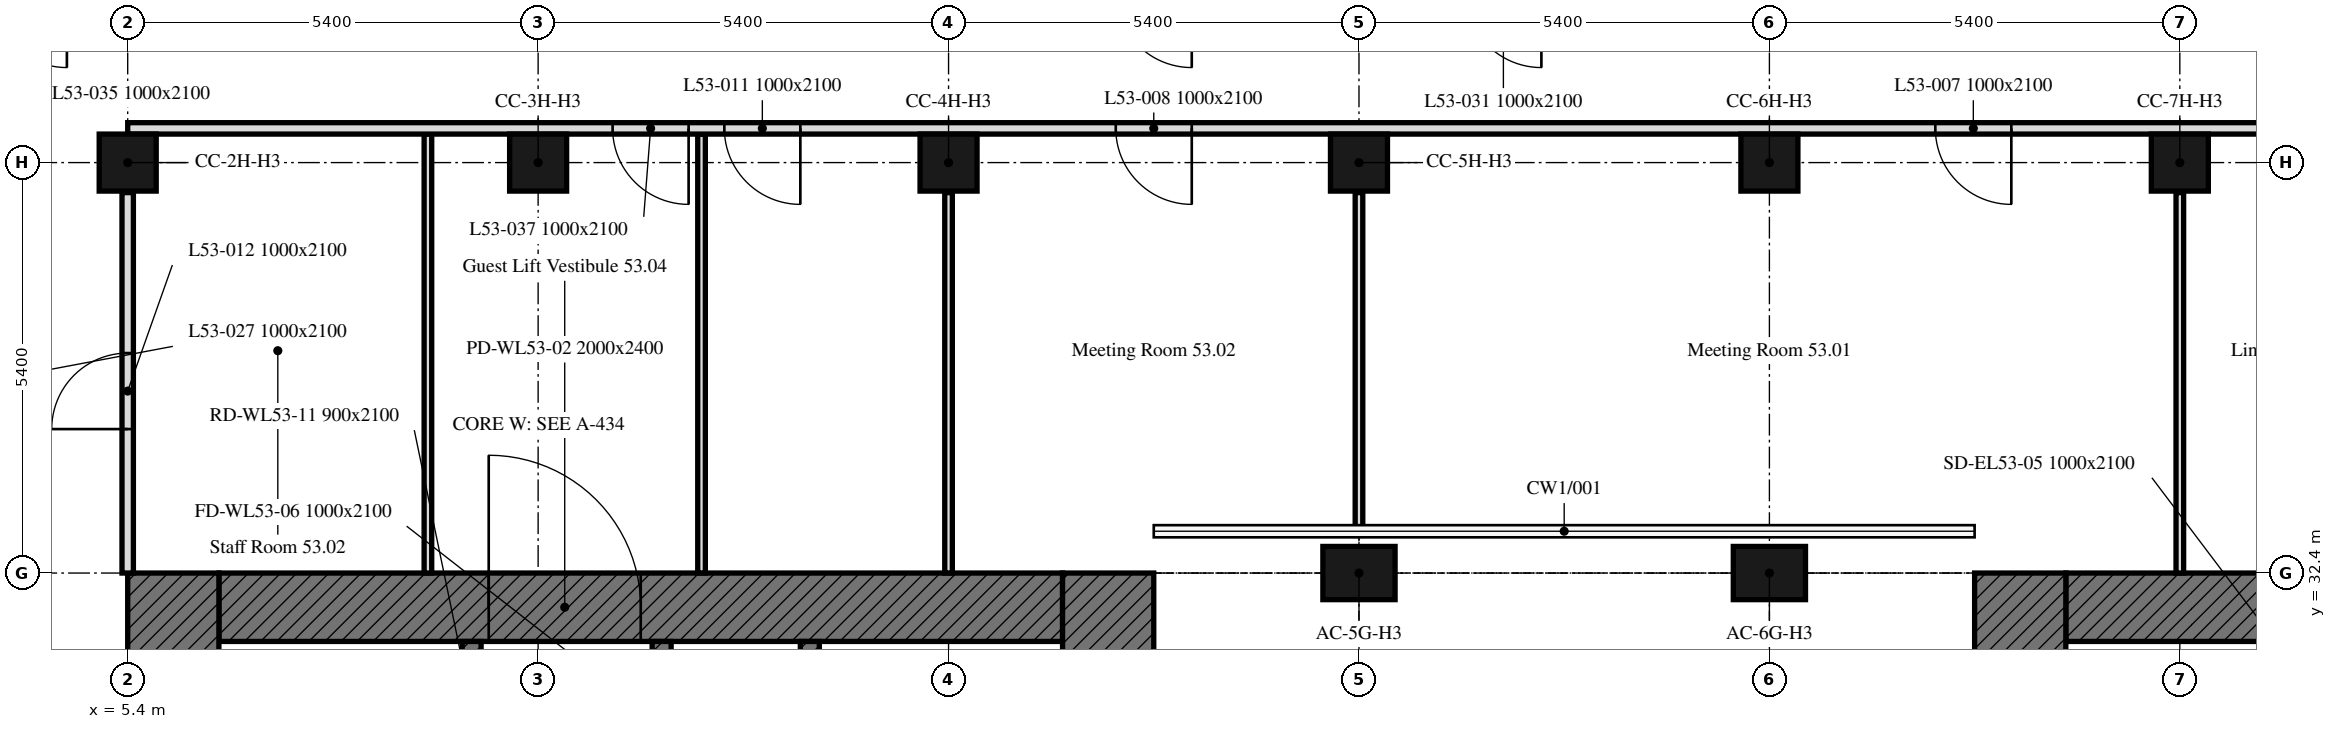
"""IFC4 building model, lengths in metres.
Left out: names, types, materials, properties, quantities, classifications, styles, units other than length and angle.
Written with IfcOpenShell. Run it as: python <this file> out.ifc"""

import sys

from ifc_helpers import new_model, si_unit, direction, frame, frame_2d, origin, origin_2d, place, context, subcontext, project, spatial, rectangle, extrude, element, fill, save


model = new_model("IFC4")
c1 = context("Model", 3, precision=1e-05, world=origin(), true_north=direction((0.0, 1.0)))
c2 = subcontext(c1, "Body", "Model", "MODEL_VIEW")
j1 = project(units=[si_unit("LENGTHUNIT", "METRE"), si_unit("PLANEANGLEUNIT", "RADIAN")], contexts=[c1])
p1 = place(None, origin())
s1 = spatial("IfcSite", under=j1, at=p1, CompositionType="ELEMENT")
p2 = place(p1, origin())
s2 = spatial("IfcBuilding", under=s1, at=p2, CompositionType="ELEMENT")
p3 = place(p2, frame((0.0, 0.0, 213.7)))
s3 = spatial("IfcBuildingStorey", under=s2, at=p3, CompositionType="ELEMENT", Elevation=213.7)
for number, where, z_axis, x_axis in (
    (1, (21.6, 32.4, 0.0), (0.0, 0.0, 1.0), (1.0, 0.0, 0.0)),
    (2, (27.0, 32.4, 0.0), (0.0, 0.0, 1.0), (1.0, 0.0, 0.0)),
):
    element("IfcColumn", number, at=place(p3, frame(where, z_axis=z_axis, x_axis=x_axis)), inside=s3, PredefinedType="COLUMN", context=c2, shape_type="SweptSolid", body=[
        extrude(rectangle(XDim=0.95, YDim=0.7, at=origin_2d()), origin(), (0.0, 0.0, 1.0), 3.0),
    ])
for number, where, z_axis, x_axis in (
    (3, (5.4, 37.8, 0.0), (0.0, 0.0, 1.0), (1.0, 0.0, 0.0)),
    (4, (10.8, 37.8, 0.0), (0.0, 0.0, 1.0), (1.0, 0.0, 0.0)),
    (5, (16.2, 37.8, 0.0), (0.0, 0.0, 1.0), (1.0, 0.0, 0.0)),
    (6, (21.6, 37.8, 0.0), (0.0, 0.0, 1.0), (1.0, 0.0, 0.0)),
    (7, (27.0, 37.8, 0.0), (0.0, 0.0, 1.0), (1.0, 0.0, 0.0)),
    (8, (32.4, 37.8, 0.0), (0.0, 0.0, 1.0), (1.0, 0.0, 0.0)),
):
    element("IfcColumn", number, at=place(p3, frame(where, z_axis=z_axis, x_axis=x_axis)), inside=s3, PredefinedType="COLUMN", context=c2, shape_type="SweptSolid", body=[
        extrude(rectangle(XDim=0.75, YDim=0.75, at=origin_2d()), origin(), (0.0, 0.0, 1.0), 3.0),
    ])
p4 = place(p3, frame((6.6, 31.95, 0.0), z_axis=(0.0, 0.0, 1.0), x_axis=(1.0, 0.0, 0.0)))
e9 = element("IfcWall", 9, at=p4, inside=s3, PredefinedType="SOLIDWALL", context=c2, shape_type="SweptSolid", body=[
    extrude(rectangle(XDim=11.1, YDim=0.9, at=frame_2d((5.55, 0.0))), origin(), (0.0, 0.0, 1.0), 3.0),
])
p5 = place(p4, frame((3.55, 0.0, 0.0)))
e10 = element("IfcOpeningElement", 10, at=p5, cuts=e9, PredefinedType="OPENING", context=c2, shape_type="SweptSolid", body=[
    extrude(rectangle(XDim=2.0, YDim=2.4, at=frame_2d((1.0, 1.2))), frame((0.0, 0.45, 0.0), z_axis=(0.0, -1.0, 0.0), x_axis=(1.0, 0.0, 0.0)), (0.0, 0.0, 1.0), 0.9),
])
for number, where, z_axis, x_axis in (
    (11, (6.0, 16.2, 0.0), (0.0, 0.0, 1.0), (0.0, 1.0, 0.0)),
    (12, (18.3, 32.4, 0.0), (0.0, 0.0, 1.0), (0.0, -1.0, 0.0)),
):
    element("IfcWall", number, at=place(p3, frame(where, z_axis=z_axis, x_axis=x_axis)), inside=s3, PredefinedType="SOLIDWALL", context=c2, shape_type="SweptSolid", body=[
        extrude(rectangle(XDim=16.2, YDim=1.2, at=frame_2d((8.1, 0.0))), origin(), (0.0, 0.0, 1.0), 3.0),
    ])
p6 = place(p3, frame((9.925, 17.1, 0.0), z_axis=(0.0, 0.0, 1.0), x_axis=(0.0, 1.0, 0.0)))
e13 = element("IfcWall", 13, at=p6, inside=s3, PredefinedType="SOLIDWALL", context=c2, shape_type="SweptSolid", body=[
    extrude(rectangle(XDim=14.4, YDim=0.25, at=frame_2d((7.2, 0.0))), origin(), (0.0, 0.0, 1.0), 3.0),
])
p7 = place(p6, frame((4.6, 0.0, 0.0)))
e14 = element("IfcOpeningElement", 14, at=p7, cuts=e13, PredefinedType="OPENING", context=c2, shape_type="SweptSolid", body=[
    extrude(rectangle(XDim=1.0, YDim=2.1, at=frame_2d((0.5, 1.05))), frame((0.0, 0.125, 0.0), z_axis=(0.0, -1.0, 0.0), x_axis=(1.0, 0.0, 0.0)), (0.0, 0.0, 1.0), 0.25),
])
p8 = place(p6, frame((7.062, 0.0, 0.0)))
e15 = element("IfcOpeningElement", 15, at=p8, cuts=e13, PredefinedType="OPENING", context=c2, shape_type="SweptSolid", body=[
    extrude(rectangle(XDim=1.2, YDim=2.1, at=frame_2d((0.6, 1.05))), frame((0.0, 0.125, 0.0), z_axis=(0.0, -1.0, 0.0), x_axis=(1.0, 0.0, 0.0)), (0.0, 0.0, 1.0), 0.25),
])
p9 = place(p6, frame((9.472, 0.0, 0.0)))
e16 = element("IfcOpeningElement", 16, at=p9, cuts=e13, PredefinedType="OPENING", context=c2, shape_type="SweptSolid", body=[
    extrude(rectangle(XDim=0.9, YDim=2.1, at=frame_2d((0.45, 1.05))), frame((0.0, 0.125, 0.0), z_axis=(0.0, -1.0, 0.0), x_axis=(1.0, 0.0, 0.0)), (0.0, 0.0, 1.0), 0.25),
])
p10 = place(p6, frame((11.159, 0.0, 0.0)))
e17 = element("IfcOpeningElement", 17, at=p10, cuts=e13, PredefinedType="OPENING", context=c2, shape_type="SweptSolid", body=[
    extrude(rectangle(XDim=0.9, YDim=2.1, at=frame_2d((0.45, 1.05))), frame((0.0, 0.125, 0.0), z_axis=(0.0, -1.0, 0.0), x_axis=(1.0, 0.0, 0.0)), (0.0, 0.0, 1.0), 0.25),
])
p11 = place(p6, frame((13.1, 0.0, 0.0)))
e18 = element("IfcOpeningElement", 18, at=p11, cuts=e13, PredefinedType="OPENING", context=c2, shape_type="SweptSolid", body=[
    extrude(rectangle(XDim=0.9, YDim=2.1, at=frame_2d((0.45, 1.05))), frame((0.0, 0.125, 0.0), z_axis=(0.0, -1.0, 0.0), x_axis=(1.0, 0.0, 0.0)), (0.0, 0.0, 1.0), 0.25),
])
p12 = place(p3, frame((14.375, 17.1, 0.0), z_axis=(0.0, 0.0, 1.0), x_axis=(0.0, 1.0, 0.0)))
e19 = element("IfcWall", 19, at=p12, inside=s3, PredefinedType="SOLIDWALL", context=c2, shape_type="SweptSolid", body=[
    extrude(rectangle(XDim=14.4, YDim=0.25, at=frame_2d((7.2, 0.0))), origin(), (0.0, 0.0, 1.0), 3.0),
])
p13 = place(p12, frame((13.15, 0.0, 0.0)))
e20 = element("IfcOpeningElement", 20, at=p13, cuts=e19, PredefinedType="OPENING", context=c2, shape_type="SweptSolid", body=[
    extrude(rectangle(XDim=1.0, YDim=2.1, at=frame_2d((0.5, 1.05))), frame((0.0, 0.125, 0.0), z_axis=(0.0, -1.0, 0.0), x_axis=(1.0, 0.0, 0.0)), (0.0, 0.0, 1.0), 0.25),
])
p14 = place(p12, frame((0.6, 0.0, 0.0)))
e21 = element("IfcOpeningElement", 21, at=p14, cuts=e19, PredefinedType="OPENING", context=c2, shape_type="SweptSolid", body=[
    extrude(rectangle(XDim=1.1, YDim=2.1, at=frame_2d((0.55, 1.05))), frame((0.0, 0.125, 0.0), z_axis=(0.0, -1.0, 0.0), x_axis=(1.0, 0.0, 0.0)), (0.0, 0.0, 1.0), 0.25),
])
p15 = place(p12, frame((3.25, 0.0, 0.0)))
e22 = element("IfcOpeningElement", 22, at=p15, cuts=e19, PredefinedType="OPENING", context=c2, shape_type="SweptSolid", body=[
    extrude(rectangle(XDim=0.9, YDim=2.1, at=frame_2d((0.45, 1.05))), frame((0.0, 0.125, 0.0), z_axis=(0.0, -1.0, 0.0), x_axis=(1.0, 0.0, 0.0)), (0.0, 0.0, 1.0), 0.25),
])
p16 = place(p3, frame((12.425, 29.4, 0.0), z_axis=(0.0, 0.0, 1.0), x_axis=(0.0, 1.0, 0.0)))
e23 = element("IfcWall", 23, at=p16, inside=s3, PredefinedType="SOLIDWALL", context=c2, shape_type="SweptSolid", body=[
    extrude(rectangle(XDim=2.1, YDim=0.25, at=frame_2d((1.05, 0.0))), origin(), (0.0, 0.0, 1.0), 3.0),
])
p17 = place(p16, frame((0.5, 0.0, 0.0)))
e24 = element("IfcOpeningElement", 24, at=p17, cuts=e23, PredefinedType="OPENING", context=c2, shape_type="SweptSolid", body=[
    extrude(rectangle(XDim=1.0, YDim=2.1, at=frame_2d((0.5, 1.05))), frame((0.0, 0.125, 0.0), z_axis=(0.0, -1.0, 0.0), x_axis=(1.0, 0.0, 0.0)), (0.0, 0.0, 1.0), 0.25),
])
p18 = place(p3, frame((30.9, 31.95, 0.0), z_axis=(0.0, 0.0, 1.0), x_axis=(1.0, 0.0, 0.0)))
e25 = element("IfcWall", 25, at=p18, inside=s3, PredefinedType="SOLIDWALL", context=c2, shape_type="SweptSolid", body=[
    extrude(rectangle(XDim=11.1, YDim=0.9, at=frame_2d((5.55, 0.0))), origin(), (0.0, 0.0, 1.0), 3.0),
])
p19 = place(p18, frame((5.55, 0.0, 0.0)))
e26 = element("IfcOpeningElement", 26, at=p19, cuts=e25, PredefinedType="OPENING", context=c2, shape_type="SweptSolid", body=[
    extrude(rectangle(XDim=2.0, YDim=2.4, at=frame_2d((1.0, 1.2))), frame((0.0, 0.45, 0.0), z_axis=(0.0, -1.0, 0.0), x_axis=(1.0, 0.0, 0.0)), (0.0, 0.0, 1.0), 0.9),
])
p20 = place(p3, frame((30.3, 16.2, 0.0), z_axis=(0.0, 0.0, 1.0), x_axis=(0.0, 1.0, 0.0)))
e27 = element("IfcWall", 27, at=p20, inside=s3, PredefinedType="SOLIDWALL", context=c2, shape_type="SweptSolid", body=[
    extrude(rectangle(XDim=16.2, YDim=1.2, at=frame_2d((8.1, 0.0))), origin(), (0.0, 0.0, 1.0), 3.0),
])
p21 = place(p3, frame((32.4, 32.4, 0.0), z_axis=(0.0, 0.0, 1.0), x_axis=(0.0, 1.0, 0.0)))
e28 = element("IfcWall", 28, at=p21, inside=s3, PredefinedType="PARTITIONING", context=c2, shape_type="SweptSolid", body=[
    extrude(rectangle(XDim=5.005, YDim=0.1, at=frame_2d((2.502, 0.0))), origin(), (0.0, 0.0, 1.0), 2.4),
])
p22 = place(p3, frame((21.6, 37.405, 0.0), z_axis=(0.0, 0.0, 1.0), x_axis=(0.0, -1.0, 0.0)))
e29 = element("IfcWall", 29, at=p22, inside=s3, PredefinedType="PARTITIONING", context=c2, shape_type="SweptSolid", body=[
    extrude(rectangle(XDim=4.51, YDim=0.1, at=frame_2d((2.255, 0.0))), origin(), (0.0, 0.0, 1.0), 2.4),
])
p23 = place(p3, frame((16.2, 37.405, 0.0), z_axis=(0.0, 0.0, 1.0), x_axis=(0.0, -1.0, 0.0)))
e30 = element("IfcWall", 30, at=p23, inside=s3, PredefinedType="PARTITIONING", context=c2, shape_type="SweptSolid", body=[
    extrude(rectangle(XDim=5.005, YDim=0.1, at=frame_2d((2.502, 0.0))), origin(), (0.0, 0.0, 1.0), 2.4),
])
for number, where, z_axis, x_axis in (
    (31, (12.95, 32.4, 0.0), (0.0, 0.0, 1.0), (0.0, 1.0, 0.0)),
    (32, (9.35, 38.175, 0.0), (0.0, 0.0, 1.0), (0.0, -1.0, 0.0)),
):
    element("IfcWall", number, at=place(p3, frame(where, z_axis=z_axis, x_axis=x_axis)), inside=s3, PredefinedType="PARTITIONING", context=c2, shape_type="SweptSolid", body=[
        extrude(rectangle(XDim=5.775, YDim=0.1, at=frame_2d((2.888, 0.0))), origin(), (0.0, 0.0, 1.0), 2.4),
    ])
p24 = place(p3, frame((5.4, 32.4, 0.0), z_axis=(0.0, 0.0, 1.0), x_axis=(0.0, 1.0, 0.0)))
e33 = element("IfcWall", 33, at=p24, inside=s3, PredefinedType="PARTITIONING", context=c2, shape_type="SweptSolid", body=[
    extrude(rectangle(XDim=5.005, YDim=0.15, at=frame_2d((2.502, 0.0))), origin(), (0.0, 0.0, 1.0), 3.0),
])
p25 = place(p24, frame((1.894, 0.0, 0.0)))
e34 = element("IfcOpeningElement", 34, at=p25, cuts=e33, PredefinedType="OPENING", context=c2, shape_type="SweptSolid", body=[
    extrude(rectangle(XDim=1.0, YDim=2.1, at=frame_2d((0.5, 1.05))), frame((0.0, 0.075, 0.0), z_axis=(0.0, -1.0, 0.0), x_axis=(1.0, 0.0, 0.0)), (0.0, 0.0, 1.0), 0.15),
])
p26 = place(p3, frame((42.449, 38.25, 0.0), z_axis=(0.0, 0.0, 1.0), x_axis=(-1.0, 0.0, 0.0)))
e35 = element("IfcWall", 35, at=p26, inside=s3, PredefinedType="PARTITIONING", context=c2, shape_type="SweptSolid", body=[
    extrude(rectangle(XDim=37.049, YDim=0.15, at=frame_2d((18.524, 0.0))), origin(), (0.0, 0.0, 1.0), 2.4),
])
p27 = place(p26, frame((12.266, 0.0, 0.0)))
e36 = element("IfcOpeningElement", 36, at=p27, cuts=e35, PredefinedType="OPENING", context=c2, shape_type="SweptSolid", body=[
    extrude(rectangle(XDim=1.0, YDim=2.1, at=frame_2d((0.5, 1.05))), frame((0.0, 0.075, 0.0), z_axis=(0.0, -1.0, 0.0), x_axis=(1.0, 0.0, 0.0)), (0.0, 0.0, 1.0), 0.15),
])
p28 = place(p26, frame((23.049, 0.0, 0.0)))
e37 = element("IfcOpeningElement", 37, at=p28, cuts=e35, PredefinedType="OPENING", context=c2, shape_type="SweptSolid", body=[
    extrude(rectangle(XDim=1.0, YDim=2.1, at=frame_2d((0.5, 1.05))), frame((0.0, 0.075, 0.0), z_axis=(0.0, -1.0, 0.0), x_axis=(1.0, 0.0, 0.0)), (0.0, 0.0, 1.0), 0.15),
])
p29 = place(p26, frame((1.409, 0.0, 0.0)))
e38 = element("IfcOpeningElement", 38, at=p29, cuts=e35, PredefinedType="OPENING", context=c2, shape_type="SweptSolid", body=[
    extrude(rectangle(XDim=1.0, YDim=2.1, at=frame_2d((0.5, 1.05))), frame((0.0, 0.075, 0.0), z_axis=(0.0, -1.0, 0.0), x_axis=(1.0, 0.0, 0.0)), (0.0, 0.0, 1.0), 0.15),
])
p30 = place(p26, frame((28.199, 0.0, 0.0)))
e39 = element("IfcOpeningElement", 39, at=p30, cuts=e35, PredefinedType="OPENING", context=c2, shape_type="SweptSolid", body=[
    extrude(rectangle(XDim=1.0, YDim=2.1, at=frame_2d((0.5, 1.05))), frame((0.0, 0.075, 0.0), z_axis=(0.0, -1.0, 0.0), x_axis=(1.0, 0.0, 0.0)), (0.0, 0.0, 1.0), 0.15),
])
p31 = place(p26, frame((7.099, 0.0, 0.0)))
e40 = element("IfcOpeningElement", 40, at=p31, cuts=e35, PredefinedType="OPENING", context=c2, shape_type="SweptSolid", body=[
    extrude(rectangle(XDim=1.0, YDim=2.1, at=frame_2d((0.5, 1.05))), frame((0.0, 0.075, 0.0), z_axis=(0.0, -1.0, 0.0), x_axis=(1.0, 0.0, 0.0)), (0.0, 0.0, 1.0), 0.15),
])
p32 = place(p26, frame((5.629, 0.0, 0.0)))
e41 = element("IfcOpeningElement", 41, at=p32, cuts=e35, PredefinedType="OPENING", context=c2, shape_type="SweptSolid", body=[
    extrude(rectangle(XDim=1.0, YDim=2.1, at=frame_2d((0.5, 1.05))), frame((0.0, 0.075, 0.0), z_axis=(0.0, -1.0, 0.0), x_axis=(1.0, 0.0, 0.0)), (0.0, 0.0, 1.0), 0.15),
])
p33 = place(p26, frame((29.669, 0.0, 0.0)))
e42 = element("IfcOpeningElement", 42, at=p33, cuts=e35, PredefinedType="OPENING", context=c2, shape_type="SweptSolid", body=[
    extrude(rectangle(XDim=1.0, YDim=2.1, at=frame_2d((0.5, 1.05))), frame((0.0, 0.075, 0.0), z_axis=(0.0, -1.0, 0.0), x_axis=(1.0, 0.0, 0.0)), (0.0, 0.0, 1.0), 0.15),
])
p34 = place(p5, origin())
e43 = element("IfcDoor", 43, at=p34, inside=s3, OperationType="DOUBLE_DOOR_SINGLE_SWING", PredefinedType="DOOR", context=c2, shape_type="SweptSolid", body=[
    extrude(rectangle(XDim=2.0, YDim=2.4, at=frame_2d((1.0, 1.2))), frame((0.0, 0.025, 0.0), z_axis=(0.0, -1.0, 0.0), x_axis=(1.0, 0.0, 0.0)), (0.0, 0.0, 1.0), 0.05),
])
fill(e10, e43)
p35 = place(p27, origin())
e44 = element("IfcDoor", 44, at=p35, inside=s3, OperationType="SINGLE_SWING_LEFT", PredefinedType="DOOR", context=c2, shape_type="SweptSolid", body=[
    extrude(rectangle(XDim=1.0, YDim=2.1, at=frame_2d((0.5, 1.05))), frame((0.0, 0.025, 0.0), z_axis=(0.0, -1.0, 0.0), x_axis=(1.0, 0.0, 0.0)), (0.0, 0.0, 1.0), 0.05),
])
fill(e36, e44)
p36 = place(p28, origin())
e45 = element("IfcDoor", 45, at=p36, inside=s3, OperationType="SINGLE_SWING_RIGHT", PredefinedType="DOOR", context=c2, shape_type="SweptSolid", body=[
    extrude(rectangle(XDim=1.0, YDim=2.1, at=frame_2d((0.5, 1.05))), frame((0.0, 0.025, 0.0), z_axis=(0.0, -1.0, 0.0), x_axis=(1.0, 0.0, 0.0)), (0.0, 0.0, 1.0), 0.05),
])
fill(e37, e45)
p37 = place(p30, origin())
e46 = element("IfcDoor", 46, at=p37, inside=s3, OperationType="SINGLE_SWING_RIGHT", PredefinedType="DOOR", context=c2, shape_type="SweptSolid", body=[
    extrude(rectangle(XDim=1.0, YDim=2.1, at=frame_2d((0.5, 1.05))), frame((0.0, 0.025, 0.0), z_axis=(0.0, -1.0, 0.0), x_axis=(1.0, 0.0, 0.0)), (0.0, 0.0, 1.0), 0.05),
])
fill(e39, e46)
p38 = place(p25, origin())
e47 = element("IfcDoor", 47, at=p38, inside=s3, OperationType="SINGLE_SWING_LEFT", PredefinedType="DOOR", context=c2, shape_type="SweptSolid", body=[
    extrude(rectangle(XDim=1.0, YDim=2.1, at=frame_2d((0.5, 1.05))), frame((0.0, 0.025, 0.0), z_axis=(0.0, -1.0, 0.0), x_axis=(1.0, 0.0, 0.0)), (0.0, 0.0, 1.0), 0.05),
])
fill(e34, e47)
p39 = place(p33, origin())
e48 = element("IfcDoor", 48, at=p39, inside=s3, OperationType="SINGLE_SWING_RIGHT", PredefinedType="DOOR", context=c2, shape_type="SweptSolid", body=[
    extrude(rectangle(XDim=1.0, YDim=2.1, at=frame_2d((0.5, 1.05))), frame((0.0, 0.025, 0.0), z_axis=(0.0, -1.0, 0.0), x_axis=(1.0, 0.0, 0.0)), (0.0, 0.0, 1.0), 0.05),
])
fill(e42, e48)
save(model, sys.argv[1])
